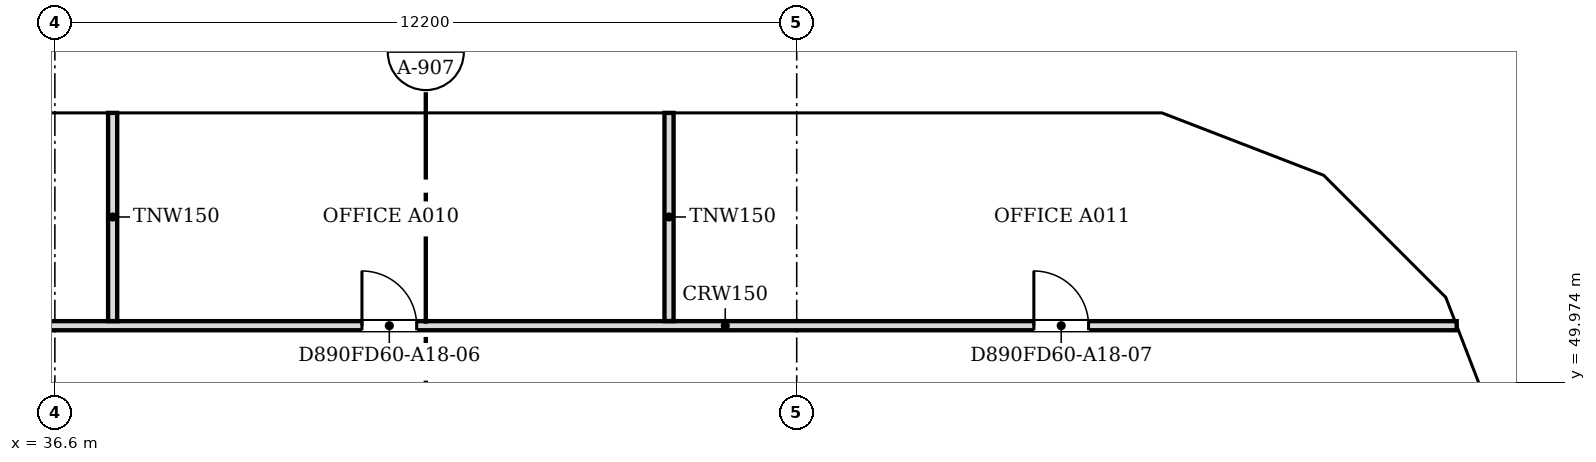
"""IFC4 building model, lengths in metres.
Left out: names, types, materials, properties, quantities, classifications, styles, units other than length and angle.
Written with IfcOpenShell. Run it as: python <this file> out.ifc"""

import sys

from ifc_helpers import new_model, si_unit, direction, frame, frame_2d, origin, place, context, subcontext, project, spatial, polyline, rectangle, outline, extrude, faceted_brep, source, transform, mapped, element, fill, save


model = new_model("IFC4")
c1 = context("Model", 3, precision=1e-05, world=origin(), true_north=direction((0.0, 1.0)))
c2 = subcontext(c1, "Body", "Model", "MODEL_VIEW")
j1 = project(units=[si_unit("LENGTHUNIT", "METRE"), si_unit("PLANEANGLEUNIT", "RADIAN")], contexts=[c1])
p1 = place(None, origin())
s1 = spatial("IfcSite", under=j1, at=p1, CompositionType="ELEMENT")
p2 = place(p1, origin())
s2 = spatial("IfcBuilding", under=s1, at=p2, CompositionType="ELEMENT")
p3 = place(p2, frame((0.0, 0.0, 197.9)))
s3 = spatial("IfcBuildingStorey", under=s2, at=p3, CompositionType="ELEMENT", Elevation=197.9)
m1 = source(origin(), c2, "Body", "Brep", [
    faceted_brep([(3.003, -0.25, 3.732), (2.95, -0.25, 3.8), (0.0, -0.25, 0.0), (3.003, -0.25, 0.0), (0.047, 0.25, 0.06), (2.898, 0.25, 3.732), (2.898, 0.25, 0.0), (0.047, 0.25, 0.0), (2.95, 0.0, 3.8), (0.0, 0.0, 0.0)], [[[0, 1, 2, 3]], [[4, 5, 6, 7]], [[8, 1, 0]], [[5, 4, 9, 2, 1, 8]], [[7, 6, 3, 2, 9]], [[7, 9, 4]], [[3, 6, 5, 8, 0]]]),
])
p4 = place(p3, frame((60.75, 48.753, 0.0), z_axis=(0.0, 0.0, 1.0), x_axis=(-0.35992665181, 0.932980602862, 0.0)))
e1 = element("IfcWall", 1, at=p4, inside=s3, PredefinedType="SOLIDWALL", context=c2, shape_type="MappedRepresentation", body=[
    mapped(m1, transform((0.0, 0.0, 0.0), scale=1.0)),
])
m2 = source(origin(), c2, "Body", "SweptSolid", [
    extrude(outline(polyline([(2.75, 3.135), (0.511, 0.25), (2.75, 0.25), (2.75, 3.135)])), frame((0.0, 0.26, 0.0), z_axis=(0.0, -1.0, 0.0), x_axis=(1.0, 0.0, 0.0)), (0.0, 0.0, 1.0), 0.52),
])
p5 = place(p4, origin())
e2 = element("IfcOpeningElement", 2, at=p5, cuts=e1, PredefinedType="OPENING", context=c2, shape_type="MappedRepresentation", body=[
    mapped(m2, transform((0.0, 0.0, 0.0), scale=1.0)),
])
m3 = source(origin(), c2, "Body", "Brep", [
    faceted_brep([(2.997, -0.25, 0.0), (0.053, -0.25, 3.8), (0.0, -0.25, 3.732), (0.0, -0.25, 0.0), (0.106, 0.25, 3.732), (2.944, 0.25, 0.068), (2.944, 0.25, 0.0), (0.106, 0.25, 0.0), (0.053, 0.0, 3.8), (2.997, 0.0, 0.0)], [[[0, 1, 2, 3]], [[4, 5, 6, 7]], [[5, 4, 8, 1, 0, 9]], [[2, 1, 8]], [[7, 6, 9, 0, 3]], [[7, 3, 2, 8, 4]], [[9, 6, 5]]]),
])
p6 = place(p3, frame((59.726, 51.469, 0.0), z_axis=(0.0, 0.0, 1.0), x_axis=(-0.707106781187, 0.707106781187, 0.0)))
e3 = element("IfcWall", 3, at=p6, inside=s3, PredefinedType="SOLIDWALL", context=c2, shape_type="MappedRepresentation", body=[
    mapped(m3, transform((0.0, 0.0, 0.0), scale=1.0)),
])
m4 = source(origin(), c2, "Body", "SweptSolid", [
    extrude(outline(polyline([(2.487, 0.25), (0.253, 3.134), (0.253, 0.25), (2.487, 0.25)])), frame((0.0, 0.26, 0.0), z_axis=(0.0, -1.0, 0.0), x_axis=(1.0, 0.0, 0.0)), (0.0, 0.0, 1.0), 0.52),
])
p7 = place(p6, origin())
e4 = element("IfcOpeningElement", 4, at=p7, cuts=e3, PredefinedType="OPENING", context=c2, shape_type="MappedRepresentation", body=[
    mapped(m4, transform((0.0, 0.0, 0.0), scale=1.0)),
])
m5 = source(origin(), c2, "Body", "Brep", [
    faceted_brep([(2.997, -0.25, 3.741), (2.95, -0.25, 3.8), (0.0, -0.25, 0.0), (2.997, -0.25, 0.0), (0.053, 0.25, 0.068), (2.904, 0.25, 3.74), (2.904, 0.25, 0.0), (0.053, 0.25, 0.0), (2.95, 0.0, 3.8), (0.0, 0.0, 0.0)], [[[0, 1, 2, 3]], [[4, 5, 6, 7]], [[8, 1, 0]], [[5, 4, 9, 2, 1, 8]], [[7, 6, 3, 2, 9]], [[7, 9, 4]], [[3, 6, 5, 8, 0]]]),
])
p8 = place(p3, frame((57.606, 53.588, 0.0), z_axis=(0.0, 0.0, 1.0), x_axis=(-0.932990326376, 0.359901446078, 0.0)))
e5 = element("IfcWall", 5, at=p8, inside=s3, PredefinedType="SOLIDWALL", context=c2, shape_type="MappedRepresentation", body=[
    mapped(m5, transform((0.0, 0.0, 0.0), scale=1.0)),
])
p9 = place(p8, origin())
e6 = element("IfcOpeningElement", 6, at=p9, cuts=e5, PredefinedType="OPENING", context=c2, shape_type="MappedRepresentation", body=[
    mapped(m2, transform((0.0, 0.0, 0.0), scale=1.0)),
])
m6 = source(origin(), c2, "Body", "Brep", [
    faceted_brep([(3.05, -0.25, 0.0), (0.047, -0.25, 3.8), (0.0, -0.25, 3.74), (0.0, -0.25, 0.0), (0.093, 0.25, 3.741), (3.05, 0.25, 0.0), (0.093, 0.25, 0.0), (0.047, 0.0, 3.8)], [[[0, 1, 2, 3]], [[4, 5, 6]], [[5, 4, 7, 1, 0]], [[2, 1, 7]], [[6, 5, 0, 3]], [[6, 3, 2, 7, 4]]]),
])
p10 = place(p3, frame((54.9, 54.65, 0.0), z_axis=(0.0, 0.0, 1.0), x_axis=(-1.0, 0.0, 0.0)))
e7 = element("IfcWall", 7, at=p10, inside=s3, PredefinedType="SOLIDWALL", context=c2, shape_type="MappedRepresentation", body=[
    mapped(m6, transform((0.0, 0.0, 0.0), scale=1.0)),
])
m7 = source(origin(), c2, "Body", "SweptSolid", [
    extrude(outline(polyline([(2.534, 0.25), (0.247, 3.144), (0.247, 0.25), (2.534, 0.25)])), frame((0.0, 0.26, 0.0), z_axis=(0.0, -1.0, 0.0), x_axis=(1.0, 0.0, 0.0)), (0.0, 0.0, 1.0), 0.52),
])
p11 = place(p10, origin())
e8 = element("IfcOpeningElement", 8, at=p11, cuts=e7, PredefinedType="OPENING", context=c2, shape_type="MappedRepresentation", body=[
    mapped(m7, transform((0.0, 0.0, 0.0), scale=1.0)),
])
m8 = source(origin(), c2, "Body", "SweptSolid", [
    extrude(outline(polyline([(6.1, 0.0), (3.05, 3.8), (0.0, 0.0), (6.1, 0.0)])), frame((0.0, 0.25, 0.0), z_axis=(0.0, -1.0, 0.0), x_axis=(1.0, 0.0, 0.0)), (0.0, 0.0, 1.0), 0.5),
])
p12 = place(p3, frame((51.85, 54.65, 0.0), z_axis=(0.0, 0.0, 1.0), x_axis=(-1.0, 0.0, 0.0)))
e9 = element("IfcWall", 9, at=p12, inside=s3, PredefinedType="SOLIDWALL", context=c2, shape_type="MappedRepresentation", body=[
    mapped(m8, transform((0.0, 0.0, 0.0), scale=1.0)),
])
m9 = source(origin(), c2, "Body", "SweptSolid", [
    extrude(outline(polyline([(5.579, 0.25), (3.05, 3.401), (0.521, 0.25), (5.579, 0.25)])), frame((0.0, 0.26, 0.0), z_axis=(0.0, -1.0, 0.0), x_axis=(1.0, 0.0, 0.0)), (0.0, 0.0, 1.0), 0.52),
])
p13 = place(p12, origin())
e10 = element("IfcOpeningElement", 10, at=p13, cuts=e9, PredefinedType="OPENING", context=c2, shape_type="MappedRepresentation", body=[
    mapped(m9, transform((0.0, 0.0, 0.0), scale=1.0)),
])
p14 = place(p3, frame((45.75, 54.65, 0.0), z_axis=(0.0, 0.0, 1.0), x_axis=(-1.0, 0.0, 0.0)))
e11 = element("IfcWall", 11, at=p14, inside=s3, PredefinedType="SOLIDWALL", context=c2, shape_type="MappedRepresentation", body=[
    mapped(m8, transform((0.0, 0.0, 0.0), scale=1.0)),
])
p15 = place(p14, origin())
e12 = element("IfcOpeningElement", 12, at=p15, cuts=e11, PredefinedType="OPENING", context=c2, shape_type="MappedRepresentation", body=[
    mapped(m9, transform((0.0, 0.0, 0.0), scale=1.0)),
])
m10 = source(origin(), c2, "Body", "Brep", [
    faceted_brep([(6.1, -0.25, 0.0), (3.05, -0.25, 3.8), (0.0, -0.25, 0.0), (6.1, -0.25, 0.0), (0.0, 0.25, 0.0), (3.05, 0.25, 3.8), (6.1, 0.25, 0.0), (6.1, 0.25, 0.0)], [[[0, 1, 2, 3]], [[4, 5, 6, 7]], [[6, 5, 1, 0]], [[5, 4, 2, 1]], [[4, 7, 3, 2]], [[3, 7, 6, 0]]]),
])
p16 = place(p3, frame((39.65, 54.65, 0.0), z_axis=(0.0, 0.0, 1.0), x_axis=(-1.0, 0.0, 0.0)))
e13 = element("IfcWall", 13, at=p16, inside=s3, PredefinedType="SOLIDWALL", context=c2, shape_type="MappedRepresentation", body=[
    mapped(m10, transform((0.0, 0.0, 0.0), scale=1.0)),
])
p17 = place(p16, origin())
e14 = element("IfcOpeningElement", 14, at=p17, cuts=e13, PredefinedType="OPENING", context=c2, shape_type="MappedRepresentation", body=[
    mapped(m9, transform((0.0, 0.0, 0.0), scale=1.0)),
])
p18 = place(p2, frame((0.0, 0.0, 201.7)))
s4 = spatial("IfcBuildingStorey", under=s2, at=p18, CompositionType="ELEMENT", Elevation=201.7)
m11 = source(origin(), c2, "Body", "Brep", [
    faceted_brep([(0.047, -0.25, 0.0), (2.997, -0.25, 3.8), (0.047, -0.25, 7.6), (0.0, -0.25, 7.541), (0.0, -0.25, 0.059), (0.093, 0.25, 7.54), (2.944, 0.25, 3.868), (2.944, 0.25, 3.732), (0.093, 0.25, 0.06), (2.997, 0.0, 3.8), (0.047, 0.0, 0.0), (0.047, 0.0, 7.6)], [[[0, 1, 2, 3, 4]], [[5, 6, 7, 8]], [[8, 7, 9, 1, 0, 10]], [[6, 5, 11, 2, 1, 9]], [[3, 2, 11]], [[10, 0, 4]], [[8, 10, 4, 3, 11, 5]], [[9, 7, 6]]]),
])
p19 = place(p18, frame((60.767, 48.71, -3.8), z_axis=(0.0, 0.0, 1.0), x_axis=(-0.359901446078, 0.932990326376, 0.0)))
e15 = element("IfcWall", 15, at=p19, inside=s4, PredefinedType="SOLIDWALL", context=c2, shape_type="MappedRepresentation", body=[
    mapped(m11, transform((0.0, 0.0, 0.0), scale=1.0)),
])
m12 = source(origin(), c2, "Body", "SweptSolid", [
    extrude(outline(polyline([(0.247, 0.665), (2.681, 3.8), (0.247, 6.935), (0.247, 0.665)])), frame((0.0, 0.26, 0.0), z_axis=(0.0, -1.0, 0.0), x_axis=(1.0, 0.0, 0.0)), (0.0, 0.0, 1.0), 0.52),
])
p20 = place(p19, origin())
e16 = element("IfcOpeningElement", 16, at=p20, cuts=e15, PredefinedType="OPENING", context=c2, shape_type="MappedRepresentation", body=[
    mapped(m12, transform((0.0, 0.0, 0.0), scale=1.0)),
])
m13 = source(origin(), c2, "Body", "Brep", [
    faceted_brep([(2.944, -0.25, 0.0), (2.997, -0.25, 0.068), (2.997, -0.25, 7.532), (2.944, -0.25, 7.6), (0.0, -0.25, 3.8), (0.053, 0.25, 3.868), (2.891, 0.25, 7.532), (2.891, 0.25, 0.068), (0.053, 0.25, 3.732), (2.944, 0.0, 0.0), (2.944, 0.0, 7.6), (0.0, 0.0, 3.8)], [[[0, 1, 2, 3, 4]], [[5, 6, 7, 8]], [[1, 0, 9]], [[10, 3, 2]], [[6, 5, 11, 4, 3, 10]], [[8, 7, 9, 0, 4, 11]], [[8, 11, 5]], [[1, 9, 7, 6, 10, 2]]]),
])
p21 = place(p18, frame((59.688, 51.506, -3.8), z_axis=(0.0, 0.0, 1.0), x_axis=(-0.707106781187, 0.707106781187, 0.0)))
e17 = element("IfcWall", 17, at=p21, inside=s4, PredefinedType="SOLIDWALL", context=c2, shape_type="MappedRepresentation", body=[
    mapped(m13, transform((0.0, 0.0, 0.0), scale=1.0)),
])
m14 = source(origin(), c2, "Body", "SweptSolid", [
    extrude(outline(polyline([(2.744, 6.934), (0.316, 3.8), (2.744, 0.667), (2.744, 6.934)])), frame((0.0, 0.26, 0.0), z_axis=(0.0, -1.0, 0.0), x_axis=(1.0, 0.0, 0.0)), (0.0, 0.0, 1.0), 0.52),
])
p22 = place(p21, origin())
e18 = element("IfcOpeningElement", 18, at=p22, cuts=e17, PredefinedType="OPENING", context=c2, shape_type="MappedRepresentation", body=[
    mapped(m14, transform((0.0, 0.0, 0.0), scale=1.0)),
])
m15 = source(origin(), c2, "Body", "Brep", [
    faceted_brep([(0.053, -0.25, 0.0), (3.003, -0.25, 3.8), (0.053, -0.25, 7.6), (0.0, -0.25, 7.532), (0.0, -0.25, 0.068), (0.106, 0.25, 7.532), (2.957, 0.25, 3.86), (2.957, 0.25, 3.74), (0.106, 0.25, 0.068), (3.003, 0.0, 3.8), (0.053, 0.0, 0.0), (0.053, 0.0, 7.6)], [[[0, 1, 2, 3, 4]], [[5, 6, 7, 8]], [[8, 7, 9, 1, 0, 10]], [[6, 5, 11, 2, 1, 9]], [[3, 2, 11]], [[10, 0, 4]], [[8, 10, 4, 3, 11, 5]], [[9, 7, 6]]]),
])
p23 = place(p18, frame((57.656, 53.569, -3.8), z_axis=(0.0, 0.0, 1.0), x_axis=(-0.933007896601, 0.359855894603, 0.0)))
e19 = element("IfcWall", 19, at=p23, inside=s4, PredefinedType="SOLIDWALL", context=c2, shape_type="MappedRepresentation", body=[
    mapped(m15, transform((0.0, 0.0, 0.0), scale=1.0)),
])
m16 = source(origin(), c2, "Body", "SweptSolid", [
    extrude(outline(polyline([(0.253, 0.665), (2.687, 3.8), (0.253, 6.935), (0.253, 0.665)])), frame((0.0, 0.26, 0.0), z_axis=(0.0, -1.0, 0.0), x_axis=(1.0, 0.0, 0.0)), (0.0, 0.0, 1.0), 0.52),
])
p24 = place(p23, origin())
e20 = element("IfcOpeningElement", 20, at=p24, cuts=e19, PredefinedType="OPENING", context=c2, shape_type="MappedRepresentation", body=[
    mapped(m16, transform((0.0, 0.0, 0.0), scale=1.0)),
])
m17 = source(origin(), c2, "Body", "Brep", [
    faceted_brep([(3.003, -0.25, 0.0), (6.053, -0.25, 3.8), (3.003, -0.25, 7.6), (0.0, -0.25, 3.8), (0.047, 0.25, 3.859), (3.003, 0.25, 7.6), (6.053, 0.25, 3.8), (3.003, 0.25, 0.0), (0.047, 0.25, 3.741), (0.0, 0.0, 3.8)], [[[0, 1, 2, 3]], [[4, 5, 6, 7, 8]], [[7, 6, 1, 0]], [[6, 5, 2, 1]], [[5, 4, 9, 3, 2]], [[8, 7, 0, 3, 9]], [[8, 9, 4]]]),
])
p25 = place(p18, frame((54.854, 54.65, -3.8), z_axis=(0.0, 0.0, 1.0), x_axis=(-1.0, 0.0, 0.0)))
e21 = element("IfcWall", 21, at=p25, inside=s4, PredefinedType="SOLIDWALL", context=c2, shape_type="MappedRepresentation", body=[
    mapped(m17, transform((0.0, 0.0, 0.0), scale=1.0)),
])
m18 = source(origin(), c2, "Body", "SweptSolid", [
    extrude(outline(polyline([(3.005, 0.401), (5.733, 3.8), (3.005, 7.199), (0.319, 3.8), (3.005, 0.401)])), frame((0.0, 0.26, 0.0), z_axis=(0.0, -1.0, 0.0), x_axis=(1.0, 0.0, 0.0)), (0.0, 0.0, 1.0), 0.52),
])
p26 = place(p25, origin())
e22 = element("IfcOpeningElement", 22, at=p26, cuts=e21, PredefinedType="OPENING", context=c2, shape_type="MappedRepresentation", body=[
    mapped(m18, transform((0.0, 0.0, 0.0), scale=1.0)),
])
m19 = source(origin(), c2, "Body", "SweptSolid", [
    extrude(outline(polyline([(3.05, 0.0), (6.1, 3.8), (3.05, 7.6), (0.0, 3.8), (3.05, 0.0)])), frame((0.0, 0.25, 0.0), z_axis=(0.0, -1.0, 0.0), x_axis=(1.0, 0.0, 0.0)), (0.0, 0.0, 1.0), 0.5),
])
p27 = place(p18, frame((48.8, 54.65, -3.8), z_axis=(0.0, 0.0, 1.0), x_axis=(-1.0, 0.0, 0.0)))
e23 = element("IfcWall", 23, at=p27, inside=s4, PredefinedType="SOLIDWALL", context=c2, shape_type="MappedRepresentation", body=[
    mapped(m19, transform((0.0, 0.0, 0.0), scale=1.0)),
])
m20 = source(origin(), c2, "Body", "SweptSolid", [
    extrude(outline(polyline([(3.05, 0.399), (5.78, 3.8), (3.05, 7.201), (0.321, 3.8), (3.05, 0.399)])), frame((0.0, 0.26, 0.0), z_axis=(0.0, -1.0, 0.0), x_axis=(1.0, 0.0, 0.0)), (0.0, 0.0, 1.0), 0.52),
])
p28 = place(p27, origin())
e24 = element("IfcOpeningElement", 24, at=p28, cuts=e23, PredefinedType="OPENING", context=c2, shape_type="MappedRepresentation", body=[
    mapped(m20, transform((0.0, 0.0, 0.0), scale=1.0)),
])
m21 = source(origin(), c2, "Body", "Brep", [
    faceted_brep([(3.05, -0.25, 0.0), (6.1, -0.25, 3.8), (6.1, -0.25, 3.8), (3.05, -0.25, 7.6), (0.0, -0.25, 3.8), (0.0, 0.25, 3.8), (3.05, 0.25, 7.6), (6.1, 0.25, 3.8), (6.1, 0.25, 3.8), (3.05, 0.25, 0.0)], [[[0, 1, 2, 3, 4]], [[5, 6, 7, 8, 9]], [[9, 8, 1, 0]], [[7, 6, 3, 2]], [[6, 5, 4, 3]], [[5, 9, 0, 4]], [[1, 8, 7, 2]]]),
])
p29 = place(p18, frame((42.7, 54.65, -3.8), z_axis=(0.0, 0.0, 1.0), x_axis=(-1.0, 0.0, 0.0)))
e25 = element("IfcWall", 25, at=p29, inside=s4, PredefinedType="SOLIDWALL", context=c2, shape_type="MappedRepresentation", body=[
    mapped(m21, transform((0.0, 0.0, 0.0), scale=1.0)),
])
p30 = place(p29, origin())
e26 = element("IfcOpeningElement", 26, at=p30, cuts=e25, PredefinedType="OPENING", context=c2, shape_type="MappedRepresentation", body=[
    mapped(m20, transform((0.0, 0.0, 0.0), scale=1.0)),
])
p31 = place(p18, frame((36.6, 54.65, -3.8), z_axis=(0.0, 0.0, 1.0), x_axis=(-1.0, 0.0, 0.0)))
e27 = element("IfcWall", 27, at=p31, inside=s4, PredefinedType="SOLIDWALL", context=c2, shape_type="MappedRepresentation", body=[
    mapped(m19, transform((0.0, 0.0, 0.0), scale=1.0)),
])
p32 = place(p31, origin())
e28 = element("IfcOpeningElement", 28, at=p32, cuts=e27, PredefinedType="OPENING", context=c2, shape_type="MappedRepresentation", body=[
    mapped(m20, transform((0.0, 0.0, 0.0), scale=1.0)),
])
p33 = place(p3, frame((28.4, 50.9, 0.0), z_axis=(0.0, 0.0, 1.0), x_axis=(1.0, 0.0, 0.0)))
e29 = element("IfcWall", 29, at=p33, inside=s3, PredefinedType="PARTITIONING", context=c2, shape_type="SweptSolid", body=[
    extrude(rectangle(XDim=31.254, YDim=0.15, at=frame_2d((15.627, 0.0))), origin(), (0.0, 0.0, 1.0), 3.067),
])
m22 = source(origin(), c2, "Body", "SweptSolid", [
    extrude(rectangle(XDim=0.9, YDim=2.1, at=frame_2d((0.45, 1.05))), frame((0.0, 0.085, 0.0), z_axis=(0.0, -1.0, 0.0), x_axis=(1.0, 0.0, 0.0)), (0.0, 0.0, 1.0), 0.17),
])
p34 = place(p33, frame((4.1, 0.0, 0.0)))
e30 = element("IfcOpeningElement", 30, at=p34, cuts=e29, PredefinedType="OPENING", context=c2, shape_type="MappedRepresentation", body=[
    mapped(m22, transform((0.0, 0.0, 0.0), scale=1.0)),
])
p35 = place(p33, frame((13.25, 0.0, 0.0)))
e31 = element("IfcOpeningElement", 31, at=p35, cuts=e29, PredefinedType="OPENING", context=c2, shape_type="MappedRepresentation", body=[
    mapped(m22, transform((0.0, 0.0, 0.0), scale=1.0)),
])
p36 = place(p33, frame((24.3, 0.0, 0.0)))
e32 = element("IfcOpeningElement", 32, at=p36, cuts=e29, PredefinedType="OPENING", context=c2, shape_type="MappedRepresentation", body=[
    mapped(m22, transform((0.0, 0.0, 0.0), scale=1.0)),
])
for number, where, z_axis, x_axis in (
    (33, (37.55, 50.976, 0.0), (0.0, 0.0, 1.0), (0.0, 1.0, 0.0)),
    (34, (46.7, 50.976, 0.0), (0.0, 0.0, 1.0), (0.0, 1.0, 0.0)),
):
    element("IfcWall", number, at=place(p3, frame(where, z_axis=z_axis, x_axis=x_axis)), inside=s3, PredefinedType="PARTITIONING", context=c2, shape_type="SweptSolid", body=[
        extrude(rectangle(XDim=3.424, YDim=0.15, at=frame_2d((1.712, 0.0))), origin(), (0.0, 0.0, 1.0), 3.067),
    ])
m23 = source(origin(), c2, "Body", "SweptSolid", [
    extrude(rectangle(XDim=0.9, YDim=2.1, at=frame_2d((0.45, 1.05))), frame((0.0, 0.025, 0.0), z_axis=(0.0, -1.0, 0.0), x_axis=(1.0, 0.0, 0.0)), (0.0, 0.0, 1.0), 0.05),
])
p37 = place(p35, origin())
e35 = element("IfcDoor", 35, at=p37, inside=s3, OperationType="SINGLE_SWING_LEFT", PredefinedType="DOOR", context=c2, shape_type="MappedRepresentation", body=[
    mapped(m23, transform((0.0, 0.0, 0.0), scale=1.0)),
])
fill(e31, e35)
p38 = place(p36, origin())
e36 = element("IfcDoor", 36, at=p38, inside=s3, OperationType="SINGLE_SWING_LEFT", PredefinedType="DOOR", context=c2, shape_type="MappedRepresentation", body=[
    mapped(m23, transform((0.0, 0.0, 0.0), scale=1.0)),
])
fill(e32, e36)
save(model, sys.argv[1])
